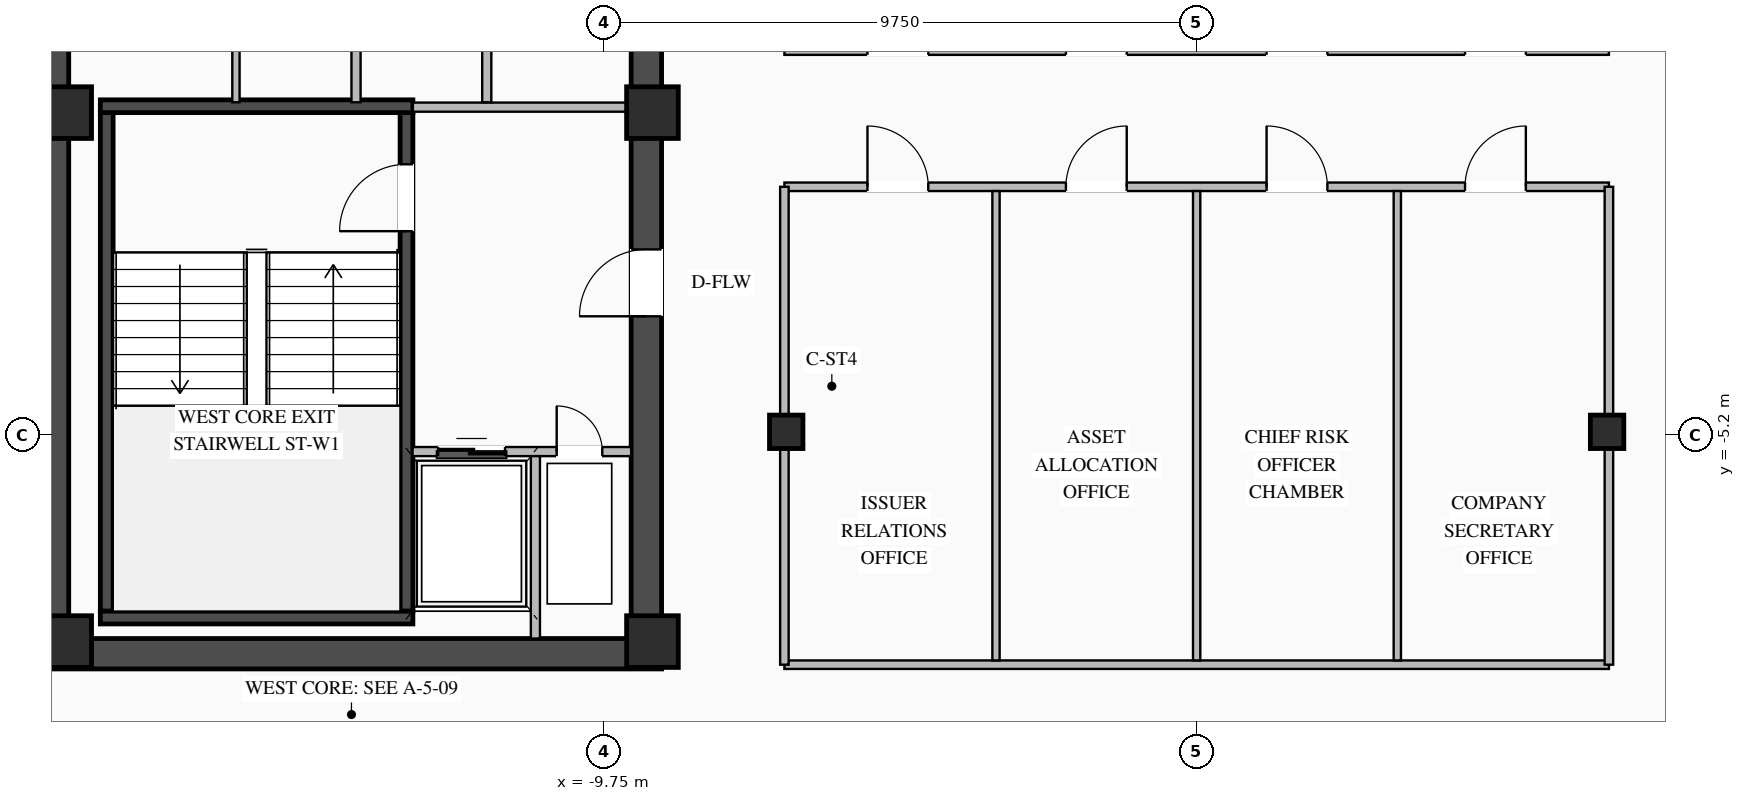
"""IFC4 building model, lengths in metres.
Left out: names, types, materials, properties, quantities, classifications, styles, units other than length and angle.
Written with IfcOpenShell. Run it as: python <this file> out.ifc"""

import sys

from ifc_helpers import new_model, si_unit, direction, frame, frame_2d, origin, origin_2d, place, context, subcontext, project, spatial, rectangle, i_section, extrude, element, fill, save


model = new_model("IFC4")
c1 = context("Model", 3, precision=1e-05, world=origin(), true_north=direction((0.0, 1.0)))
c2 = subcontext(c1, "Body", "Model", "MODEL_VIEW")
j1 = project(units=[si_unit("LENGTHUNIT", "METRE"), si_unit("PLANEANGLEUNIT", "RADIAN")], contexts=[c1])
p1 = place(None, origin())
s1 = spatial("IfcSite", under=j1, at=p1, CompositionType="ELEMENT")
p2 = place(p1, origin())
s2 = spatial("IfcBuilding", under=s1, at=p2, CompositionType="ELEMENT")
p3 = place(p2, frame((0.0, 0.0, 236.1)))
s3 = spatial("IfcBuildingStorey", under=s2, at=p3, CompositionType="ELEMENT", Elevation=236.1)
p4 = place(p3, frame((-19.05, -8.8, 0.0), z_axis=(0.0, 0.0, 1.0), x_axis=(1.0, 0.0, 0.0)))
e1 = element("IfcWall", 1, at=p4, inside=s3, PredefinedType="SHEAR", context=c2, shape_type="SweptSolid", body=[
    extrude(rectangle(XDim=10.25, YDim=0.5, at=frame_2d((5.125, 0.0))), origin(), (0.0, 0.0, 1.0), 3.27),
])
p5 = place(p3, frame((-18.8, -8.55, 0.0), z_axis=(0.0, 0.0, 1.0), x_axis=(0.0, 1.0, 0.0)))
e2 = element("IfcWall", 2, at=p5, inside=s3, PredefinedType="SHEAR", context=c2, shape_type="SweptSolid", body=[
    extrude(rectangle(XDim=17.1, YDim=0.5, at=frame_2d((8.55, 0.0))), origin(), (0.0, 0.0, 1.0), 3.27),
])
p6 = place(p3, frame((-9.05, -8.55, 0.0), z_axis=(0.0, 0.0, 1.0), x_axis=(0.0, 1.0, 0.0)))
e3 = element("IfcWall", 3, at=p6, inside=s3, PredefinedType="SHEAR", context=c2, shape_type="SweptSolid", body=[
    extrude(rectangle(XDim=17.1, YDim=0.5, at=frame_2d((8.55, 0.0))), origin(), (0.0, 0.0, 1.0), 3.27),
])
p7 = place(p6, frame((5.3, 0.0, 0.0)))
e4 = element("IfcOpeningElement", 4, at=p7, cuts=e3, PredefinedType="OPENING", context=c2, shape_type="SweptSolid", body=[
    extrude(rectangle(XDim=1.1, YDim=2.08, at=frame_2d((0.55, 1.04))), frame((0.0, 0.26, 0.0), z_axis=(0.0, -1.0, 0.0), x_axis=(1.0, 0.0, 0.0)), (0.0, 0.0, 1.0), 0.52),
])
p8 = place(p3, frame((-12.995, -8.1, 0.0), z_axis=(0.0, 0.0, 1.0), x_axis=(0.0, 1.0, 0.0)))
e5 = element("IfcWall", 5, at=p8, inside=s3, PredefinedType="SHEAR", context=c2, shape_type="SweptSolid", body=[
    extrude(rectangle(XDim=8.2, YDim=0.21, at=frame_2d((4.1, 0.0))), origin(), (0.0, 0.0, 1.0), 3.27),
])
p9 = place(p8, frame((6.25, 0.0, 0.0)))
e6 = element("IfcOpeningElement", 6, at=p9, cuts=e5, PredefinedType="OPENING", context=c2, shape_type="SweptSolid", body=[
    extrude(rectangle(XDim=1.1, YDim=2.15, at=frame_2d((0.55, 1.075))), frame((0.0, 0.115, 0.0), z_axis=(0.0, -1.0, 0.0), x_axis=(1.0, 0.0, 0.0)), (0.0, 0.0, 1.0), 0.23),
])
p10 = place(p3, frame((-17.925, -8.1, 0.0), z_axis=(0.0, 0.0, 1.0), x_axis=(0.0, 1.0, 0.0)))
e7 = element("IfcWall", 7, at=p10, inside=s3, PredefinedType="SHEAR", context=c2, shape_type="SweptSolid", body=[
    extrude(rectangle(XDim=8.2, YDim=0.21, at=frame_2d((4.1, 0.0))), origin(), (0.0, 0.0, 1.0), 3.27),
])
for number, where, z_axis, x_axis in (
    (8, (-18.03, -8.205, 0.0), (0.0, 0.0, 1.0), (1.0, 0.0, 0.0)),
    (9, (-12.89, 0.205, 0.0), (0.0, 0.0, 1.0), (-1.0, 0.0, 0.0)),
):
    element("IfcWall", number, at=place(p3, frame(where, z_axis=z_axis, x_axis=x_axis)), inside=s3, PredefinedType="SHEAR", context=c2, shape_type="SweptSolid", body=[
        extrude(rectangle(XDim=5.14, YDim=0.21, at=frame_2d((2.57, 0.0))), origin(), (0.0, 0.0, 1.0), 3.27),
    ])
for number, where, z_axis, x_axis in (
    (10, (-8.95, -8.6, 0.0), (0.0, 0.0, 1.0), (1.0, 0.0, 0.0)),
    (11, (-8.95, 0.1, 0.0), (0.0, 0.0, 1.0), (1.0, 0.0, 0.0)),
    (12, (-18.6, -8.6, 0.0), (0.0, 0.0, 1.0), (1.0, 0.0, 0.0)),
    (13, (-18.6, 0.1, 0.0), (0.0, 0.0, 1.0), (1.0, 0.0, 0.0)),
):
    element("IfcColumn", number, at=place(p3, frame(where, z_axis=z_axis, x_axis=x_axis)), inside=s3, PredefinedType="COLUMN", context=c2, shape_type="SweptSolid", body=[
        extrude(rectangle(XDim=0.85, YDim=0.85, at=origin_2d()), origin(), (0.0, 0.0, 1.0), 3.45),
    ])
for number, where, z_axis, x_axis in (
    (14, (-6.75, -5.15, 0.0), (0.0, 0.0, 1.0), (1.0, 0.0, 0.0)),
    (15, (6.75, -5.15, 0.0), (0.0, 0.0, 1.0), (1.0, 0.0, 0.0)),
):
    element("IfcColumn", number, at=place(p3, frame(where, z_axis=z_axis, x_axis=x_axis)), inside=s3, PredefinedType="COLUMN", context=c2, shape_type="SweptSolid", body=[
        extrude(i_section(OverallWidth=0.55, OverallDepth=0.55, WebThickness=0.024, FlangeThickness=0.036, at=origin_2d()), origin(), (0.0, 0.0, 1.0), 3.45),
    ])
p11 = place(p3, frame((-12.895, -5.475, 0.0), z_axis=(0.0, 0.0, 1.0), x_axis=(1.0, 0.0, 0.0)))
e16 = element("IfcWall", 16, at=p11, inside=s3, PredefinedType="STANDARD", context=c2, shape_type="SweptSolid", body=[
    extrude(rectangle(XDim=3.595, YDim=0.15, at=frame_2d((1.797, 0.0))), origin(), (0.0, 0.0, 1.0), 3.25),
])
p12 = place(p11, frame((0.42, 0.0, 0.0)))
e17 = element("IfcOpeningElement", 17, at=p12, cuts=e16, PredefinedType="OPENING", context=c2, shape_type="SweptSolid", body=[
    extrude(rectangle(XDim=1.1, YDim=2.15, at=frame_2d((0.55, 1.075))), frame((0.0, 0.085, 0.0), z_axis=(0.0, -1.0, 0.0), x_axis=(1.0, 0.0, 0.0)), (0.0, 0.0, 1.0), 0.17),
])
p13 = place(p11, frame((2.37, 0.0, 0.0)))
e18 = element("IfcOpeningElement", 18, at=p13, cuts=e16, PredefinedType="OPENING", context=c2, shape_type="SweptSolid", body=[
    extrude(rectangle(XDim=0.75, YDim=2.05, at=frame_2d((0.375, 1.025))), frame((0.0, 0.085, 0.0), z_axis=(0.0, -1.0, 0.0), x_axis=(1.0, 0.0, 0.0)), (0.0, 0.0, 1.0), 0.17),
])
p14 = place(p3, frame((-10.875, -8.55, 0.0), z_axis=(0.0, 0.0, 1.0), x_axis=(0.0, 1.0, 0.0)))
e19 = element("IfcWall", 19, at=p14, inside=s3, PredefinedType="STANDARD", context=c2, shape_type="SweptSolid", body=[
    extrude(rectangle(XDim=3.0, YDim=0.15, at=frame_2d((1.5, 0.0))), origin(), (0.0, 0.0, 1.0), 3.25),
])
p15 = place(p3, frame((-12.89, 0.19, 0.0), z_axis=(0.0, 0.0, 1.0), x_axis=(1.0, 0.0, 0.0)))
e20 = element("IfcWall", 20, at=p15, inside=s3, PredefinedType="STANDARD", context=c2, shape_type="SweptSolid", body=[
    extrude(rectangle(XDim=3.59, YDim=0.15, at=frame_2d((1.795, 0.0))), origin(), (0.0, 0.0, 1.0), 2.645),
])
p16 = place(p3, frame((-11.675, 0.27, 0.0), z_axis=(0.0, 0.0, 1.0), x_axis=(0.0, 1.0, 0.0)))
e21 = element("IfcWall", 21, at=p16, inside=s3, PredefinedType="STANDARD", context=c2, shape_type="SweptSolid", body=[
    extrude(rectangle(XDim=8.28, YDim=0.15, at=frame_2d((4.14, 0.0))), origin(), (0.0, 0.0, 1.0), 3.25),
])
p17 = place(p16, frame((2.65, 0.0, 0.0)))
e22 = element("IfcOpeningElement", 22, at=p17, cuts=e21, PredefinedType="OPENING", context=c2, shape_type="SweptSolid", body=[
    extrude(rectangle(XDim=0.9, YDim=2.05, at=frame_2d((0.45, 1.025))), frame((0.0, 0.085, 0.0), z_axis=(0.0, -1.0, 0.0), x_axis=(1.0, 0.0, 0.0)), (0.0, 0.0, 1.0), 0.17),
])
p18 = place(p16, frame((6.45, 0.0, 0.0)))
e23 = element("IfcOpeningElement", 23, at=p18, cuts=e21, PredefinedType="OPENING", context=c2, shape_type="SweptSolid", body=[
    extrude(rectangle(XDim=0.9, YDim=2.05, at=frame_2d((0.45, 1.025))), frame((0.0, 0.085, 0.0), z_axis=(0.0, -1.0, 0.0), x_axis=(1.0, 0.0, 0.0)), (0.0, 0.0, 1.0), 0.17),
])
p19 = place(p3, frame((-13.825, 0.27, 0.0), z_axis=(0.0, 0.0, 1.0), x_axis=(0.0, 1.0, 0.0)))
e24 = element("IfcWall", 24, at=p19, inside=s3, PredefinedType="STANDARD", context=c2, shape_type="SweptSolid", body=[
    extrude(rectangle(XDim=8.28, YDim=0.15, at=frame_2d((4.14, 0.0))), origin(), (0.0, 0.0, 1.0), 3.25),
])
p20 = place(p19, frame((4.175, 0.0, 0.0)))
e25 = element("IfcOpeningElement", 25, at=p20, cuts=e24, PredefinedType="OPENING", context=c2, shape_type="SweptSolid", body=[
    extrude(rectangle(XDim=1.1, YDim=2.1, at=frame_2d((0.55, 1.05))), frame((0.0, 0.085, 0.0), z_axis=(0.0, -1.0, 0.0), x_axis=(1.0, 0.0, 0.0)), (0.0, 0.0, 1.0), 0.17),
])
p21 = place(p19, frame((6.245, 0.0, 0.0)))
e26 = element("IfcOpeningElement", 26, at=p21, cuts=e24, PredefinedType="OPENING", context=c2, shape_type="SweptSolid", body=[
    extrude(rectangle(XDim=1.1, YDim=2.1, at=frame_2d((0.55, 1.05))), frame((0.0, 0.085, 0.0), z_axis=(0.0, -1.0, 0.0), x_axis=(1.0, 0.0, 0.0)), (0.0, 0.0, 1.0), 0.17),
])
p22 = place(p19, frame((1.15, 0.0, 0.0)))
e27 = element("IfcOpeningElement", 27, at=p22, cuts=e24, PredefinedType="OPENING", context=c2, shape_type="SweptSolid", body=[
    extrude(rectangle(XDim=0.9, YDim=2.05, at=frame_2d((0.45, 1.025))), frame((0.0, 0.085, 0.0), z_axis=(0.0, -1.0, 0.0), x_axis=(1.0, 0.0, 0.0)), (0.0, 0.0, 1.0), 0.17),
])
p23 = place(p3, frame((-15.8, 0.27, 0.0), z_axis=(0.0, 0.0, 1.0), x_axis=(0.0, 1.0, 0.0)))
e28 = element("IfcWall", 28, at=p23, inside=s3, PredefinedType="STANDARD", context=c2, shape_type="SweptSolid", body=[
    extrude(rectangle(XDim=3.59, YDim=0.12, at=frame_2d((1.795, 0.0))), origin(), (0.0, 0.0, 1.0), 3.25),
])
p24 = place(p23, frame((1.25, 0.0, 0.0)))
e29 = element("IfcOpeningElement", 29, at=p24, cuts=e28, PredefinedType="OPENING", context=c2, shape_type="SweptSolid", body=[
    extrude(rectangle(XDim=0.85, YDim=2.05, at=frame_2d((0.425, 1.025))), frame((0.0, 0.07, 0.0), z_axis=(0.0, -1.0, 0.0), x_axis=(1.0, 0.0, 0.0)), (0.0, 0.0, 1.0), 0.14),
])
p25 = place(p3, frame((-6.78, 1.12, 0.0), z_axis=(0.0, 0.0, 1.0), x_axis=(1.0, 0.0, 0.0)))
e30 = element("IfcWall", 30, at=p25, inside=s3, PredefinedType="STANDARD", context=c2, shape_type="SweptSolid", body=[
    extrude(rectangle(XDim=13.56, YDim=0.14, at=frame_2d((6.78, 0.0))), origin(), (0.0, 0.0, 1.0), 3.25),
])
p26 = place(p25, frame((1.366, 0.0, 0.0)))
e31 = element("IfcOpeningElement", 31, at=p26, cuts=e30, PredefinedType="OPENING", context=c2, shape_type="SweptSolid", body=[
    extrude(rectangle(XDim=1.0, YDim=2.08, at=frame_2d((0.5, 1.04))), frame((0.0, 0.08, 0.0), z_axis=(0.0, -1.0, 0.0), x_axis=(1.0, 0.0, 0.0)), (0.0, 0.0, 1.0), 0.16),
])
p27 = place(p25, frame((4.63, 0.0, 0.0)))
e32 = element("IfcOpeningElement", 32, at=p27, cuts=e30, PredefinedType="OPENING", context=c2, shape_type="SweptSolid", body=[
    extrude(rectangle(XDim=1.0, YDim=2.08, at=frame_2d((0.5, 1.04))), frame((0.0, 0.08, 0.0), z_axis=(0.0, -1.0, 0.0), x_axis=(1.0, 0.0, 0.0)), (0.0, 0.0, 1.0), 0.16),
])
p28 = place(p25, frame((7.93, 0.0, 0.0)))
e33 = element("IfcOpeningElement", 33, at=p28, cuts=e30, PredefinedType="OPENING", context=c2, shape_type="SweptSolid", body=[
    extrude(rectangle(XDim=1.0, YDim=2.08, at=frame_2d((0.5, 1.04))), frame((0.0, 0.08, 0.0), z_axis=(0.0, -1.0, 0.0), x_axis=(1.0, 0.0, 0.0)), (0.0, 0.0, 1.0), 0.16),
])
p29 = place(p25, frame((11.194, 0.0, 0.0)))
e34 = element("IfcOpeningElement", 34, at=p29, cuts=e30, PredefinedType="OPENING", context=c2, shape_type="SweptSolid", body=[
    extrude(rectangle(XDim=1.0, YDim=2.08, at=frame_2d((0.5, 1.04))), frame((0.0, 0.08, 0.0), z_axis=(0.0, -1.0, 0.0), x_axis=(1.0, 0.0, 0.0)), (0.0, 0.0, 1.0), 0.16),
])
p30 = place(p3, frame((-6.78, -1.12, 0.0), z_axis=(0.0, 0.0, 1.0), x_axis=(1.0, 0.0, 0.0)))
e35 = element("IfcWall", 35, at=p30, inside=s3, PredefinedType="STANDARD", context=c2, shape_type="SweptSolid", body=[
    extrude(rectangle(XDim=13.56, YDim=0.14, at=frame_2d((6.78, 0.0))), origin(), (0.0, 0.0, 1.0), 3.25),
])
p31 = place(p30, frame((1.366, 0.0, 0.0)))
e36 = element("IfcOpeningElement", 36, at=p31, cuts=e35, PredefinedType="OPENING", context=c2, shape_type="SweptSolid", body=[
    extrude(rectangle(XDim=1.0, YDim=2.08, at=frame_2d((0.5, 1.04))), frame((0.0, 0.08, 0.0), z_axis=(0.0, -1.0, 0.0), x_axis=(1.0, 0.0, 0.0)), (0.0, 0.0, 1.0), 0.16),
])
p32 = place(p30, frame((4.63, 0.0, 0.0)))
e37 = element("IfcOpeningElement", 37, at=p32, cuts=e35, PredefinedType="OPENING", context=c2, shape_type="SweptSolid", body=[
    extrude(rectangle(XDim=1.0, YDim=2.08, at=frame_2d((0.5, 1.04))), frame((0.0, 0.08, 0.0), z_axis=(0.0, -1.0, 0.0), x_axis=(1.0, 0.0, 0.0)), (0.0, 0.0, 1.0), 0.16),
])
p33 = place(p30, frame((7.93, 0.0, 0.0)))
e38 = element("IfcOpeningElement", 38, at=p33, cuts=e35, PredefinedType="OPENING", context=c2, shape_type="SweptSolid", body=[
    extrude(rectangle(XDim=1.0, YDim=2.08, at=frame_2d((0.5, 1.04))), frame((0.0, 0.08, 0.0), z_axis=(0.0, -1.0, 0.0), x_axis=(1.0, 0.0, 0.0)), (0.0, 0.0, 1.0), 0.16),
])
p34 = place(p30, frame((11.194, 0.0, 0.0)))
e39 = element("IfcOpeningElement", 39, at=p34, cuts=e35, PredefinedType="OPENING", context=c2, shape_type="SweptSolid", body=[
    extrude(rectangle(XDim=1.0, YDim=2.08, at=frame_2d((0.5, 1.04))), frame((0.0, 0.08, 0.0), z_axis=(0.0, -1.0, 0.0), x_axis=(1.0, 0.0, 0.0)), (0.0, 0.0, 1.0), 0.16),
])
p35 = place(p3, frame((-6.78, -8.98, 0.0), z_axis=(0.0, 0.0, 1.0), x_axis=(1.0, 0.0, 0.0)))
e40 = element("IfcWall", 40, at=p35, inside=s3, PredefinedType="STANDARD", context=c2, shape_type="SweptSolid", body=[
    extrude(rectangle(XDim=13.56, YDim=0.14, at=frame_2d((6.78, 0.0))), origin(), (0.0, 0.0, 1.0), 3.25),
])
for number, where, z_axis, x_axis in (
    (41, (-6.78, -8.98, 0.0), (0.0, 0.0, 1.0), (0.0, 1.0, 0.0)),
    (42, (6.78, -8.98, 0.0), (0.0, 0.0, 1.0), (0.0, 1.0, 0.0)),
):
    element("IfcWall", number, at=place(p3, frame(where, z_axis=z_axis, x_axis=x_axis)), inside=s3, PredefinedType="STANDARD", context=c2, shape_type="SweptSolid", body=[
        extrude(rectangle(XDim=7.86, YDim=0.14, at=frame_2d((3.93, 0.0))), origin(), (0.0, 0.0, 1.0), 2.645),
    ])
for number, where, z_axis, x_axis in (
    (43, (-3.3, -8.91, 0.0), (0.0, 0.0, 1.0), (0.0, 1.0, 0.0)),
    (44, (0.0, -8.91, 0.0), (0.0, 0.0, 1.0), (0.0, 1.0, 0.0)),
    (45, (3.3, -8.91, 0.0), (0.0, 0.0, 1.0), (0.0, 1.0, 0.0)),
):
    element("IfcWall", number, at=place(p3, frame(where, z_axis=z_axis, x_axis=x_axis)), inside=s3, PredefinedType="STANDARD", context=c2, shape_type="SweptSolid", body=[
        extrude(rectangle(XDim=7.72, YDim=0.12, at=frame_2d((3.86, 0.0))), origin(), (0.0, 0.0, 1.0), 3.25),
    ])
p36 = place(p9, origin())
e46 = element("IfcDoor", 46, at=p36, inside=s3, OperationType="SINGLE_SWING_LEFT", PredefinedType="DOOR", context=c2, shape_type="SweptSolid", body=[
    extrude(rectangle(XDim=1.1, YDim=2.15, at=frame_2d((0.55, 1.075))), frame((0.0, 0.025, 0.0), z_axis=(0.0, -1.0, 0.0), x_axis=(1.0, 0.0, 0.0)), (0.0, 0.0, 1.0), 0.05),
])
fill(e6, e46)
p37 = place(p12, origin())
e47 = element("IfcDoor", 47, at=p37, inside=s3, OperationType="DOUBLE_DOOR_SLIDING", PredefinedType="DOOR", context=c2, shape_type="SweptSolid", body=[
    extrude(rectangle(XDim=1.1, YDim=2.15, at=frame_2d((0.55, 1.075))), frame((0.0, 0.025, 0.0), z_axis=(0.0, -1.0, 0.0), x_axis=(1.0, 0.0, 0.0)), (0.0, 0.0, 1.0), 0.05),
])
fill(e17, e47)
p38 = place(p13, origin())
e48 = element("IfcDoor", 48, at=p38, inside=s3, OperationType="SINGLE_SWING_LEFT", PredefinedType="DOOR", context=c2, shape_type="SweptSolid", body=[
    extrude(rectangle(XDim=0.75, YDim=2.05, at=frame_2d((0.375, 1.025))), frame((0.0, 0.025, 0.0), z_axis=(0.0, -1.0, 0.0), x_axis=(1.0, 0.0, 0.0)), (0.0, 0.0, 1.0), 0.05),
])
fill(e18, e48)
p39 = place(p7, origin())
e49 = element("IfcDoor", 49, at=p39, inside=s3, OperationType="SINGLE_SWING_LEFT", PredefinedType="DOOR", context=c2, shape_type="SweptSolid", body=[
    extrude(rectangle(XDim=1.1, YDim=2.08, at=frame_2d((0.55, 1.04))), frame((0.0, 0.205, 0.0), z_axis=(0.0, -1.0, 0.0), x_axis=(1.0, 0.0, 0.0)), (0.0, 0.0, 1.0), 0.05),
])
fill(e4, e49)
p40 = place(p26, origin())
e50 = element("IfcDoor", 50, at=p40, inside=s3, OperationType="SINGLE_SWING_LEFT", PredefinedType="DOOR", context=c2, shape_type="SweptSolid", body=[
    extrude(rectangle(XDim=1.0, YDim=2.08, at=frame_2d((0.5, 1.04))), frame((0.0, 0.025, 0.0), z_axis=(0.0, -1.0, 0.0), x_axis=(1.0, 0.0, 0.0)), (0.0, 0.0, 1.0), 0.05),
])
fill(e31, e50)
p41 = place(p27, origin())
e51 = element("IfcDoor", 51, at=p41, inside=s3, OperationType="SINGLE_SWING_RIGHT", PredefinedType="DOOR", context=c2, shape_type="SweptSolid", body=[
    extrude(rectangle(XDim=1.0, YDim=2.08, at=frame_2d((0.5, 1.04))), frame((0.0, 0.025, 0.0), z_axis=(0.0, -1.0, 0.0), x_axis=(1.0, 0.0, 0.0)), (0.0, 0.0, 1.0), 0.05),
])
fill(e32, e51)
p42 = place(p28, origin())
e52 = element("IfcDoor", 52, at=p42, inside=s3, OperationType="SINGLE_SWING_LEFT", PredefinedType="DOOR", context=c2, shape_type="SweptSolid", body=[
    extrude(rectangle(XDim=1.0, YDim=2.08, at=frame_2d((0.5, 1.04))), frame((0.0, 0.025, 0.0), z_axis=(0.0, -1.0, 0.0), x_axis=(1.0, 0.0, 0.0)), (0.0, 0.0, 1.0), 0.05),
])
fill(e33, e52)
p43 = place(p29, origin())
e53 = element("IfcDoor", 53, at=p43, inside=s3, OperationType="SINGLE_SWING_RIGHT", PredefinedType="DOOR", context=c2, shape_type="SweptSolid", body=[
    extrude(rectangle(XDim=1.0, YDim=2.08, at=frame_2d((0.5, 1.04))), frame((0.0, 0.025, 0.0), z_axis=(0.0, -1.0, 0.0), x_axis=(1.0, 0.0, 0.0)), (0.0, 0.0, 1.0), 0.05),
])
fill(e34, e53)
p44 = place(p31, origin())
e54 = element("IfcDoor", 54, at=p44, inside=s3, OperationType="SINGLE_SWING_LEFT", PredefinedType="DOOR", context=c2, shape_type="SweptSolid", body=[
    extrude(rectangle(XDim=1.0, YDim=2.08, at=frame_2d((0.5, 1.04))), frame((0.0, 0.025, 0.0), z_axis=(0.0, -1.0, 0.0), x_axis=(1.0, 0.0, 0.0)), (0.0, 0.0, 1.0), 0.05),
])
fill(e36, e54)
p45 = place(p32, origin())
e55 = element("IfcDoor", 55, at=p45, inside=s3, OperationType="SINGLE_SWING_RIGHT", PredefinedType="DOOR", context=c2, shape_type="SweptSolid", body=[
    extrude(rectangle(XDim=1.0, YDim=2.08, at=frame_2d((0.5, 1.04))), frame((0.0, 0.025, 0.0), z_axis=(0.0, -1.0, 0.0), x_axis=(1.0, 0.0, 0.0)), (0.0, 0.0, 1.0), 0.05),
])
fill(e37, e55)
p46 = place(p33, origin())
e56 = element("IfcDoor", 56, at=p46, inside=s3, OperationType="SINGLE_SWING_LEFT", PredefinedType="DOOR", context=c2, shape_type="SweptSolid", body=[
    extrude(rectangle(XDim=1.0, YDim=2.08, at=frame_2d((0.5, 1.04))), frame((0.0, 0.025, 0.0), z_axis=(0.0, -1.0, 0.0), x_axis=(1.0, 0.0, 0.0)), (0.0, 0.0, 1.0), 0.05),
])
fill(e38, e56)
p47 = place(p34, origin())
e57 = element("IfcDoor", 57, at=p47, inside=s3, OperationType="SINGLE_SWING_RIGHT", PredefinedType="DOOR", context=c2, shape_type="SweptSolid", body=[
    extrude(rectangle(XDim=1.0, YDim=2.08, at=frame_2d((0.5, 1.04))), frame((0.0, 0.025, 0.0), z_axis=(0.0, -1.0, 0.0), x_axis=(1.0, 0.0, 0.0)), (0.0, 0.0, 1.0), 0.05),
])
fill(e39, e57)
save(model, sys.argv[1])
